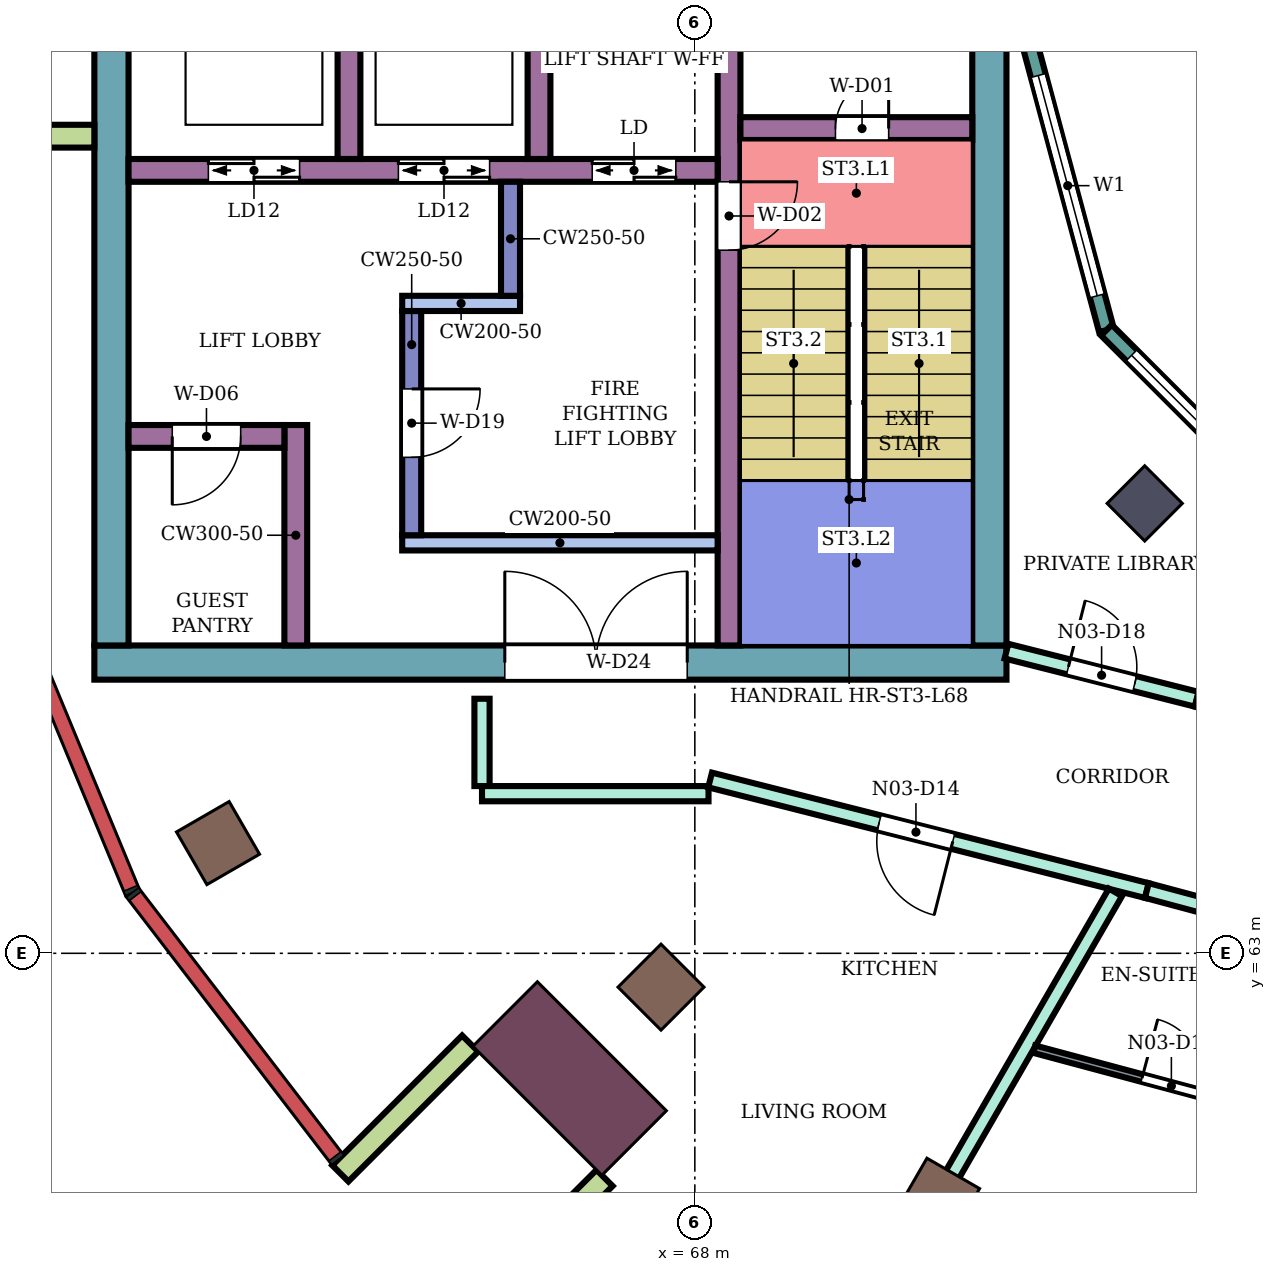
"""IFC4 building model, lengths in metres.
Left out: names, types, materials, properties, quantities, classifications, styles, units other than length and angle.
Written with IfcOpenShell. Run it as: python <this file> out.ifc"""

import sys

from ifc_helpers import new_model, si_unit, direction, frame, frame_2d, origin, origin_2d, place, context, subcontext, project, spatial, rectangle, extrude, element, fill, save


model = new_model("IFC4")
c1 = context("Model", 3, precision=1e-05, world=origin(), true_north=direction((0.0, 1.0)))
c2 = subcontext(c1, "Body", "Model", "MODEL_VIEW")
j1 = project(units=[si_unit("LENGTHUNIT", "METRE"), si_unit("PLANEANGLEUNIT", "RADIAN")], contexts=[c1])
p1 = place(None, origin())
s1 = spatial("IfcSite", under=j1, at=p1, CompositionType="ELEMENT")
p2 = place(p1, origin())
s2 = spatial("IfcBuilding", under=s1, at=p2, CompositionType="ELEMENT")
p3 = place(p2, frame((0.0, 0.0, 296.7)))
s3 = spatial("IfcBuildingStorey", under=s2, at=p3, CompositionType="ELEMENT", Elevation=296.7)
for number, where, z_axis, x_axis in (
    (1, (61.727, 64.45, 0.0), (0.0, 0.0, 1.0), (-0.866, -0.5, 0.0)),
    (2, (67.555, 62.555, 0.0), (0.0, 0.0, 1.0), (-0.707, -0.707, 0.0)),
    (3, (71.2, 59.758, 0.0), (0.0, 0.0, 1.0), (-0.5, -0.866, 0.0)),
):
    element("IfcColumn", number, at=place(p3, frame(where, z_axis=z_axis, x_axis=x_axis)), inside=s3, PredefinedType="COLUMN", context=c2, shape_type="SweptSolid", body=[
        extrude(rectangle(XDim=0.8, YDim=0.8, at=origin_2d()), origin(), (0.0, 0.0, 1.0), 4.2),
    ])
p4 = place(p3, frame((73.919, 68.919, 0.0), z_axis=(0.0, 0.0, 1.0), x_axis=(-0.707106781187, -0.707106781187, 0.0)))
e4 = element("IfcColumn", 4, at=p4, inside=s3, PredefinedType="COLUMN", context=c2, shape_type="SweptSolid", body=[
    extrude(rectangle(XDim=0.7, YDim=0.7, at=origin_2d()), origin(), (0.0, 0.0, 1.0), 4.2),
])
p5 = place(p3, frame((66.353, 61.353, 0.0), z_axis=(0.0, 0.0, 1.0), x_axis=(-0.707106781187, -0.707106781187, 0.0)))
e5 = element("IfcColumn", 5, at=p5, inside=s3, PredefinedType="COLUMN", context=c2, shape_type="SweptSolid", body=[
    extrude(rectangle(XDim=1.2, YDim=2.4, at=origin_2d()), origin(), (0.0, 0.0, 1.0), 4.2),
])
p6 = place(p3, frame((72.1, 66.825, 0.0), z_axis=(0.0, 0.0, 1.0), x_axis=(-1.0, 0.0, 0.0)))
e6 = element("IfcWall", 6, at=p6, inside=s3, PredefinedType="SHEAR", context=c2, shape_type="SweptSolid", body=[
    extrude(rectangle(XDim=12.0, YDim=0.45, at=frame_2d((6.0, 0.0))), origin(), (0.0, 0.0, 1.0), 3.88),
])
p7 = place(p6, frame((4.2, 0.0, 0.0)))
e7 = element("IfcOpeningElement", 7, at=p7, cuts=e6, PredefinedType="OPENING", context=c2, shape_type="SweptSolid", body=[
    extrude(rectangle(XDim=2.4, YDim=2.4, at=frame_2d((1.2, 1.2))), frame((0.0, 0.235, 0.0), z_axis=(0.0, -1.0, 0.0), x_axis=(1.0, 0.0, 0.0)), (0.0, 0.0, 1.0), 0.47),
])
p8 = place(p3, frame((71.875, 75.0, 0.0), z_axis=(0.0, 0.0, 1.0), x_axis=(0.0, -1.0, 0.0)))
e8 = element("IfcWall", 8, at=p8, inside=s3, PredefinedType="SHEAR", context=c2, shape_type="SweptSolid", body=[
    extrude(rectangle(XDim=7.95, YDim=0.45, at=frame_2d((3.975, 0.0))), origin(), (0.0, 0.0, 1.0), 3.88),
])
p9 = place(p3, frame((60.325, 76.4, 0.0), z_axis=(0.0, 0.0, 1.0), x_axis=(0.0, -1.0, 0.0)))
e9 = element("IfcWall", 9, at=p9, inside=s3, PredefinedType="SHEAR", context=c2, shape_type="SweptSolid", body=[
    extrude(rectangle(XDim=9.35, YDim=0.45, at=frame_2d((4.675, 0.0))), origin(), (0.0, 0.0, 1.0), 3.88),
])
p10 = place(p3, frame((68.45, 75.0, 0.0), z_axis=(0.0, 0.0, 1.0), x_axis=(0.0, -1.0, 0.0)))
e10 = element("IfcWall", 10, at=p10, inside=s3, PredefinedType="SHEAR", context=c2, shape_type="SweptSolid", body=[
    extrude(rectangle(XDim=7.95, YDim=0.3, at=frame_2d((3.975, 0.0))), origin(), (0.0, 0.0, 1.0), 3.88),
])
p11 = place(p10, frame((1.85, 0.0, 0.0)))
e11 = element("IfcOpeningElement", 11, at=p11, cuts=e10, PredefinedType="OPENING", context=c2, shape_type="SweptSolid", body=[
    extrude(rectangle(XDim=0.9, YDim=2.1, at=frame_2d((0.45, 1.05))), frame((0.0, 0.16, 0.0), z_axis=(0.0, -1.0, 0.0), x_axis=(1.0, 0.0, 0.0)), (0.0, 0.0, 1.0), 0.32),
])
p12 = place(p3, frame((71.65, 73.85, 0.0), z_axis=(0.0, 0.0, 1.0), x_axis=(-1.0, 0.0, 0.0)))
e12 = element("IfcWall", 12, at=p12, inside=s3, PredefinedType="SHEAR", context=c2, shape_type="SweptSolid", body=[
    extrude(rectangle(XDim=3.05, YDim=0.3, at=frame_2d((1.525, 0.0))), origin(), (0.0, 0.0, 1.0), 3.88),
])
p13 = place(p12, frame((1.1, 0.0, 0.0)))
e13 = element("IfcOpeningElement", 13, at=p13, cuts=e12, PredefinedType="OPENING", context=c2, shape_type="SweptSolid", body=[
    extrude(rectangle(XDim=0.7, YDim=2.0, at=frame_2d((0.35, 1.0))), frame((0.0, 0.16, 0.0), z_axis=(0.0, -1.0, 0.0), x_axis=(1.0, 0.0, 0.0)), (0.0, 0.0, 1.0), 0.32),
])
p14 = place(p3, frame((68.3, 73.3, 0.0), z_axis=(0.0, 0.0, 1.0), x_axis=(-1.0, 0.0, 0.0)))
e14 = element("IfcWall", 14, at=p14, inside=s3, PredefinedType="SHEAR", context=c2, shape_type="SweptSolid", body=[
    extrude(rectangle(XDim=7.75, YDim=0.3, at=frame_2d((3.875, 0.0))), origin(), (0.0, 0.0, 1.0), 3.88),
])
p15 = place(p14, frame((0.55, 0.0, 0.0)))
e15 = element("IfcOpeningElement", 15, at=p15, cuts=e14, PredefinedType="OPENING", context=c2, shape_type="SweptSolid", body=[
    extrude(rectangle(XDim=1.1, YDim=2.1, at=frame_2d((0.55, 1.05))), frame((0.0, 0.16, 0.0), z_axis=(0.0, -1.0, 0.0), x_axis=(1.0, 0.0, 0.0)), (0.0, 0.0, 1.0), 0.32),
])
p16 = place(p14, frame((3.0, 0.0, 0.0)))
e16 = element("IfcOpeningElement", 16, at=p16, cuts=e14, PredefinedType="OPENING", context=c2, shape_type="SweptSolid", body=[
    extrude(rectangle(XDim=1.2, YDim=2.1, at=frame_2d((0.6, 1.05))), frame((0.0, 0.16, 0.0), z_axis=(0.0, -1.0, 0.0), x_axis=(1.0, 0.0, 0.0)), (0.0, 0.0, 1.0), 0.32),
])
p17 = place(p14, frame((5.5, 0.0, 0.0)))
e17 = element("IfcOpeningElement", 17, at=p17, cuts=e14, PredefinedType="OPENING", context=c2, shape_type="SweptSolid", body=[
    extrude(rectangle(XDim=1.2, YDim=2.1, at=frame_2d((0.6, 1.05))), frame((0.0, 0.16, 0.0), z_axis=(0.0, -1.0, 0.0), x_axis=(1.0, 0.0, 0.0)), (0.0, 0.0, 1.0), 0.32),
])
for number, where, z_axis, x_axis in (
    (18, (65.95, 76.0, 0.0), (0.0, 0.0, 1.0), (0.0, -1.0, 0.0)),
    (19, (63.45, 76.0, 0.0), (0.0, 0.0, 1.0), (0.0, -1.0, 0.0)),
):
    element("IfcWall", number, at=place(p3, frame(where, z_axis=z_axis, x_axis=x_axis)), inside=s3, PredefinedType="SHEAR", context=c2, shape_type="SweptSolid", body=[
        extrude(rectangle(XDim=2.55, YDim=0.3, at=frame_2d((1.275, 0.0))), origin(), (0.0, 0.0, 1.0), 3.88),
    ])
p18 = place(p3, frame((68.3, 68.4, 0.0), z_axis=(0.0, 0.0, 1.0), x_axis=(-1.0, 0.0, 0.0)))
e20 = element("IfcWall", 20, at=p18, inside=s3, PredefinedType="SHEAR", context=c2, shape_type="SweptSolid", body=[
    extrude(rectangle(XDim=4.15, YDim=0.2, at=frame_2d((2.075, 0.0))), origin(), (0.0, 0.0, 1.0), 3.88),
])
p19 = place(p3, frame((64.275, 71.45, 0.0), z_axis=(0.0, 0.0, 1.0), x_axis=(0.0, -1.0, 0.0)))
e21 = element("IfcWall", 21, at=p19, inside=s3, PredefinedType="SHEAR", context=c2, shape_type="SweptSolid", body=[
    extrude(rectangle(XDim=2.95, YDim=0.25, at=frame_2d((1.475, 0.0))), origin(), (0.0, 0.0, 1.0), 3.88),
])
p20 = place(p19, frame((1.025, 0.0, 0.0)))
e22 = element("IfcOpeningElement", 22, at=p20, cuts=e21, PredefinedType="OPENING", context=c2, shape_type="SweptSolid", body=[
    extrude(rectangle(XDim=0.9, YDim=2.1, at=frame_2d((0.45, 1.05))), frame((0.0, 0.135, 0.0), z_axis=(0.0, -1.0, 0.0), x_axis=(1.0, 0.0, 0.0)), (0.0, 0.0, 1.0), 0.27),
])
p21 = place(p3, frame((65.7, 71.55, 0.0), z_axis=(0.0, 0.0, 1.0), x_axis=(-1.0, 0.0, 0.0)))
e23 = element("IfcWall", 23, at=p21, inside=s3, PredefinedType="SHEAR", context=c2, shape_type="SweptSolid", body=[
    extrude(rectangle(XDim=1.55, YDim=0.2, at=frame_2d((0.775, 0.0))), origin(), (0.0, 0.0, 1.0), 3.88),
])
p22 = place(p3, frame((65.575, 73.15, 0.0), z_axis=(0.0, 0.0, 1.0), x_axis=(0.0, -1.0, 0.0)))
e24 = element("IfcWall", 24, at=p22, inside=s3, PredefinedType="SHEAR", context=c2, shape_type="SweptSolid", body=[
    extrude(rectangle(XDim=1.5, YDim=0.25, at=frame_2d((0.75, 0.0))), origin(), (0.0, 0.0, 1.0), 3.88),
])
p23 = place(p3, frame((62.75, 69.95, 0.0), z_axis=(0.0, 0.0, 1.0), x_axis=(0.0, -1.0, 0.0)))
e25 = element("IfcWall", 25, at=p23, inside=s3, PredefinedType="SHEAR", context=c2, shape_type="SweptSolid", body=[
    extrude(rectangle(XDim=2.9, YDim=0.3, at=frame_2d((1.45, 0.0))), origin(), (0.0, 0.0, 1.0), 3.88),
])
p24 = place(p3, frame((62.6, 69.8, 0.0), z_axis=(0.0, 0.0, 1.0), x_axis=(-1.0, 0.0, 0.0)))
e26 = element("IfcWall", 26, at=p24, inside=s3, PredefinedType="SHEAR", context=c2, shape_type="SweptSolid", body=[
    extrude(rectangle(XDim=2.05, YDim=0.3, at=frame_2d((1.025, 0.0))), origin(), (0.0, 0.0, 1.0), 3.88),
])
p25 = place(p24, frame((0.575, 0.0, 0.0)))
e27 = element("IfcOpeningElement", 27, at=p25, cuts=e26, PredefinedType="OPENING", context=c2, shape_type="SweptSolid", body=[
    extrude(rectangle(XDim=0.9, YDim=2.1, at=frame_2d((0.45, 1.05))), frame((0.0, 0.16, 0.0), z_axis=(0.0, -1.0, 0.0), x_axis=(1.0, 0.0, 0.0)), (0.0, 0.0, 1.0), 0.32),
])
for number, where, z_axis, x_axis in (
    (28, (60.1, 73.75, 0.0), (0.0, 0.0, 1.0), (-1.0, 0.0, 0.0)),
    (29, (65.045, 61.812, 0.0), (0.0, 0.0, 1.0), (-0.707, -0.707, 0.0)),
    (30, (66.812, 60.045, 0.0), (0.0, 0.0, 1.0), (-0.707, -0.707, 0.0)),
):
    element("IfcWall", number, at=place(p3, frame(where, z_axis=z_axis, x_axis=x_axis)), inside=s3, PredefinedType="NOTDEFINED", context=c2, shape_type="SweptSolid", body=[
        extrude(rectangle(XDim=2.416, YDim=0.3, at=frame_2d((1.208, 0.0))), origin(), (0.0, 0.0, 1.0), 4.2),
    ])
p26 = place(p3, frame((72.396, 75.0, 0.0), z_axis=(0.0, 0.0, 1.0), x_axis=(0.258789828301, -0.965933654434, 0.0)))
e31 = element("IfcWall", 31, at=p26, inside=s3, PredefinedType="NOTDEFINED", context=c2, shape_type="SweptSolid", body=[
    extrude(rectangle(XDim=3.936, YDim=0.2, at=frame_2d((1.968, 0.0))), origin(), (0.0, 0.0, 1.0), 4.2),
])
p27 = place(p26, frame((0.468, 0.0, 0.9)))
e32 = element("IfcOpeningElement", 32, at=p27, cuts=e31, PredefinedType="OPENING", context=c2, shape_type="SweptSolid", body=[
    extrude(rectangle(XDim=3.0, YDim=2.3, at=frame_2d((1.5, 1.15))), frame((0.0, 0.11, 0.0), z_axis=(0.0, -1.0, 0.0), x_axis=(1.0, 0.0, 0.0)), (0.0, 0.0, 1.0), 0.22),
])
p28 = place(p3, frame((73.415, 71.198, 0.0), z_axis=(0.0, 0.0, 1.0), x_axis=(0.707106781187, -0.707106781187, 0.0)))
e33 = element("IfcWall", 33, at=p28, inside=s3, PredefinedType="NOTDEFINED", context=c2, shape_type="SweptSolid", body=[
    extrude(rectangle(XDim=3.936, YDim=0.2, at=frame_2d((1.968, 0.0))), origin(), (0.0, 0.0, 1.0), 4.2),
])
p29 = place(p28, frame((0.468, 0.0, 0.9)))
e34 = element("IfcOpeningElement", 34, at=p29, cuts=e33, PredefinedType="OPENING", context=c2, shape_type="SweptSolid", body=[
    extrude(rectangle(XDim=3.0, YDim=2.3, at=frame_2d((1.5, 1.15))), frame((0.0, 0.11, 0.0), z_axis=(0.0, -1.0, 0.0), x_axis=(1.0, 0.0, 0.0)), (0.0, 0.0, 1.0), 0.22),
])
p30 = place(p3, frame((65.2, 65.2, 0.0), z_axis=(0.0, 0.0, 1.0), x_axis=(0.0, 1.0, 0.0)))
e35 = element("IfcWall", 35, at=p30, inside=s3, PredefinedType="PARTITIONING", context=c2, shape_type="SweptSolid", body=[
    extrude(rectangle(XDim=1.149, YDim=0.2, at=frame_2d((0.575, 0.0))), origin(), (0.0, 0.0, 1.0), 3.75),
])
p31 = place(p3, frame((65.2, 65.1, 0.0), z_axis=(0.0, 0.0, 1.0), x_axis=(1.0, 0.0, 0.0)))
e36 = element("IfcWall", 36, at=p31, inside=s3, PredefinedType="PARTITIONING", context=c2, shape_type="SweptSolid", body=[
    extrude(rectangle(XDim=2.98, YDim=0.2, at=frame_2d((1.49, 0.0))), origin(), (0.0, 0.0, 1.0), 3.75),
])
p32 = place(p3, frame((68.201, 65.28, 0.0), z_axis=(0.0, 0.0, 1.0), x_axis=(0.969421088032, -0.245403247897, 0.0)))
e37 = element("IfcWall", 37, at=p32, inside=s3, PredefinedType="PARTITIONING", context=c2, shape_type="SweptSolid", body=[
    extrude(rectangle(XDim=5.927, YDim=0.2, at=frame_2d((2.964, 0.0))), origin(), (0.0, 0.0, 1.0), 3.75),
])
p33 = place(p32, frame((2.293, 0.0, 0.0)))
e38 = element("IfcOpeningElement", 38, at=p33, cuts=e37, PredefinedType="OPENING", context=c2, shape_type="SweptSolid", body=[
    extrude(rectangle(XDim=1.0, YDim=2.1, at=frame_2d((0.5, 1.05))), frame((0.0, 0.11, 0.0), z_axis=(0.0, -1.0, 0.0), x_axis=(1.0, 0.0, 0.0)), (0.0, 0.0, 1.0), 0.22),
])
p34 = place(p3, frame((68.849, 55.692, 0.0), z_axis=(0.0, 0.0, 1.0), x_axis=(0.50011732958, 0.865957652922, 0.0)))
e39 = element("IfcWall", 39, at=p34, inside=s3, PredefinedType="PARTITIONING", context=c2, shape_type="SweptSolid", body=[
    extrude(rectangle(XDim=9.365, YDim=0.2, at=frame_2d((4.683, 0.0))), origin(), (0.0, 0.0, 1.0), 3.75),
])
p35 = place(p3, frame((72.1, 66.975, 0.0), z_axis=(0.0, 0.0, 1.0), x_axis=(0.969471314457, -0.245204752086, 0.0)))
e40 = element("IfcWall", 40, at=p35, inside=s3, PredefinedType="PARTITIONING", context=c2, shape_type="SweptSolid", body=[
    extrude(rectangle(XDim=2.582, YDim=0.2, at=frame_2d((1.291, 0.0))), origin(), (0.0, 0.0, 1.0), 3.75),
])
p36 = place(p35, frame((0.841, 0.0, 0.0)))
e41 = element("IfcOpeningElement", 41, at=p36, cuts=e40, PredefinedType="OPENING", context=c2, shape_type="SweptSolid", body=[
    extrude(rectangle(XDim=0.9, YDim=2.1, at=frame_2d((0.45, 1.05))), frame((0.0, 0.11, 0.0), z_axis=(0.0, -1.0, 0.0), x_axis=(1.0, 0.0, 0.0)), (0.0, 0.0, 1.0), 0.22),
])
p37 = place(p3, frame((73.947, 63.826, 0.0), z_axis=(0.0, 0.0, 1.0), x_axis=(0.965908253407, -0.258884619088, 0.0)))
e42 = element("IfcWall", 42, at=p37, inside=s3, PredefinedType="PARTITIONING", context=c2, shape_type="SweptSolid", body=[
    extrude(rectangle(XDim=6.217, YDim=0.2, at=frame_2d((3.108, 0.0))), origin(), (0.0, 0.0, 1.0), 3.75),
])
p38 = place(p3, frame((74.603, 66.342, 0.0), z_axis=(0.0, 0.0, 1.0), x_axis=(0.965920893652, -0.258837453254, 0.0)))
e43 = element("IfcWall", 43, at=p38, inside=s3, PredefinedType="PARTITIONING", context=c2, shape_type="SweptSolid", body=[
    extrude(rectangle(XDim=5.458, YDim=0.2, at=frame_2d((2.729, 0.0))), origin(), (0.0, 0.0, 1.0), 3.75),
])
p39 = place(p38, frame((2.512, 0.0, 0.0)))
e44 = element("IfcOpeningElement", 44, at=p39, cuts=e43, PredefinedType="OPENING", context=c2, shape_type="SweptSolid", body=[
    extrude(rectangle(XDim=0.9, YDim=2.1, at=frame_2d((0.45, 1.05))), frame((0.0, 0.11, 0.0), z_axis=(0.0, -1.0, 0.0), x_axis=(1.0, 0.0, 0.0)), (0.0, 0.0, 1.0), 0.22),
])
p40 = place(p3, frame((72.465, 61.739, 0.0), z_axis=(0.0, 0.0, 1.0), x_axis=(0.965899611634, -0.258916859715, 0.0)))
e45 = element("IfcWall", 45, at=p40, inside=s3, PredefinedType="PARTITIONING", context=c2, shape_type="SweptSolid", body=[
    extrude(rectangle(XDim=7.74, YDim=0.1, at=frame_2d((3.87, 0.0))), origin(), (0.0, 0.0, 1.0), 3.75),
])
p41 = place(p40, frame((1.468, 0.0, 0.0)))
e46 = element("IfcOpeningElement", 46, at=p41, cuts=e45, PredefinedType="OPENING", context=c2, shape_type="SweptSolid", body=[
    extrude(rectangle(XDim=0.8, YDim=2.1, at=frame_2d((0.4, 1.05))), frame((0.0, 0.06, 0.0), z_axis=(0.0, -1.0, 0.0), x_axis=(1.0, 0.0, 0.0)), (0.0, 0.0, 1.0), 0.12),
])
p42 = place(p3, frame((74.229, 53.462, 0.0), z_axis=(0.0, 0.0, 1.0), x_axis=(0.258810097991, 0.965928223616, 0.0)))
e47 = element("IfcWall", 47, at=p42, inside=s3, PredefinedType="PARTITIONING", context=c2, shape_type="SweptSolid", body=[
    extrude(rectangle(XDim=9.838, YDim=0.1, at=frame_2d((4.919, 0.0))), origin(), (0.0, 0.0, 1.0), 3.75),
])
p43 = place(p42, frame((3.344, 0.0, 0.0)))
e48 = element("IfcOpeningElement", 48, at=p43, cuts=e47, PredefinedType="OPENING", context=c2, shape_type="SweptSolid", body=[
    extrude(rectangle(XDim=0.9, YDim=2.1, at=frame_2d((0.45, 1.05))), frame((0.0, 0.06, 0.0), z_axis=(0.0, -1.0, 0.0), x_axis=(1.0, 0.0, 0.0)), (0.0, 0.0, 1.0), 0.12),
])
p44 = place(p27, origin())
e49 = element("IfcWindow", 49, at=p44, inside=s3, PartitioningType="SINGLE_PANEL", PredefinedType="WINDOW", context=c2, shape_type="SweptSolid", body=[
    extrude(rectangle(XDim=3.0, YDim=2.3, at=frame_2d((1.5, 1.15))), frame((0.0, 0.03, 0.0), z_axis=(0.0, -1.0, 0.0), x_axis=(1.0, 0.0, 0.0)), (0.0, 0.0, 1.0), 0.06),
])
fill(e32, e49)
p45 = place(p29, origin())
e50 = element("IfcWindow", 50, at=p45, inside=s3, PartitioningType="SINGLE_PANEL", PredefinedType="WINDOW", context=c2, shape_type="SweptSolid", body=[
    extrude(rectangle(XDim=3.0, YDim=2.3, at=frame_2d((1.5, 1.15))), frame((0.0, 0.03, 0.0), z_axis=(0.0, -1.0, 0.0), x_axis=(1.0, 0.0, 0.0)), (0.0, 0.0, 1.0), 0.06),
])
fill(e34, e50)
p46 = place(p41, origin())
e51 = element("IfcDoor", 51, at=p46, inside=s3, OperationType="SINGLE_SWING_LEFT", PredefinedType="DOOR", context=c2, shape_type="SweptSolid", body=[
    extrude(rectangle(XDim=0.8, YDim=2.1, at=frame_2d((0.4, 1.05))), frame((0.0, 0.025, 0.0), z_axis=(0.0, -1.0, 0.0), x_axis=(1.0, 0.0, 0.0)), (0.0, 0.0, 1.0), 0.05),
])
fill(e46, e51)
p47 = place(p33, frame((1.0, 0.0, 0.0), z_axis=(0.0, 0.0, 1.0), x_axis=(-1.0, 0.0, 0.0)))
e52 = element("IfcDoor", 52, at=p47, inside=s3, OperationType="SINGLE_SWING_LEFT", PredefinedType="DOOR", context=c2, shape_type="SweptSolid", body=[
    extrude(rectangle(XDim=1.0, YDim=2.1, at=frame_2d((0.5, 1.05))), frame((0.0, 0.025, 0.0), z_axis=(0.0, -1.0, 0.0), x_axis=(1.0, 0.0, 0.0)), (0.0, 0.0, 1.0), 0.05),
])
fill(e38, e52)
p48 = place(p36, origin())
e53 = element("IfcDoor", 53, at=p48, inside=s3, OperationType="SINGLE_SWING_LEFT", PredefinedType="DOOR", context=c2, shape_type="SweptSolid", body=[
    extrude(rectangle(XDim=0.9, YDim=2.1, at=frame_2d((0.45, 1.05))), frame((0.0, 0.025, 0.0), z_axis=(0.0, -1.0, 0.0), x_axis=(1.0, 0.0, 0.0)), (0.0, 0.0, 1.0), 0.05),
])
fill(e41, e53)
p49 = place(p13, frame((0.7, 0.0, 0.0), z_axis=(0.0, 0.0, 1.0), x_axis=(-1.0, 0.0, 0.0)))
e54 = element("IfcDoor", 54, at=p49, inside=s3, OperationType="SINGLE_SWING_RIGHT", PredefinedType="DOOR", context=c2, shape_type="SweptSolid", body=[
    extrude(rectangle(XDim=0.7, YDim=2.0, at=frame_2d((0.35, 1.0))), frame((0.0, 0.025, 0.0), z_axis=(0.0, -1.0, 0.0), x_axis=(1.0, 0.0, 0.0)), (0.0, 0.0, 1.0), 0.05),
])
fill(e13, e54)
p50 = place(p11, origin())
e55 = element("IfcDoor", 55, at=p50, inside=s3, OperationType="SINGLE_SWING_LEFT", PredefinedType="DOOR", context=c2, shape_type="SweptSolid", body=[
    extrude(rectangle(XDim=0.9, YDim=2.1, at=frame_2d((0.45, 1.05))), frame((0.0, 0.025, 0.0), z_axis=(0.0, -1.0, 0.0), x_axis=(1.0, 0.0, 0.0)), (0.0, 0.0, 1.0), 0.05),
])
fill(e11, e55)
p51 = place(p15, origin())
e56 = element("IfcDoor", 56, at=p51, inside=s3, OperationType="DOUBLE_DOOR_SLIDING", PredefinedType="DOOR", context=c2, shape_type="SweptSolid", body=[
    extrude(rectangle(XDim=1.1, YDim=2.1, at=frame_2d((0.55, 1.05))), frame((0.0, 0.025, 0.0), z_axis=(0.0, -1.0, 0.0), x_axis=(1.0, 0.0, 0.0)), (0.0, 0.0, 1.0), 0.05),
])
fill(e15, e56)
p52 = place(p16, origin())
e57 = element("IfcDoor", 57, at=p52, inside=s3, OperationType="DOUBLE_DOOR_SLIDING", PredefinedType="DOOR", context=c2, shape_type="SweptSolid", body=[
    extrude(rectangle(XDim=1.2, YDim=2.1, at=frame_2d((0.6, 1.05))), frame((0.0, 0.025, 0.0), z_axis=(0.0, -1.0, 0.0), x_axis=(1.0, 0.0, 0.0)), (0.0, 0.0, 1.0), 0.05),
])
fill(e16, e57)
p53 = place(p17, origin())
e58 = element("IfcDoor", 58, at=p53, inside=s3, OperationType="DOUBLE_DOOR_SLIDING", PredefinedType="DOOR", context=c2, shape_type="SweptSolid", body=[
    extrude(rectangle(XDim=1.2, YDim=2.1, at=frame_2d((0.6, 1.05))), frame((0.0, 0.025, 0.0), z_axis=(0.0, -1.0, 0.0), x_axis=(1.0, 0.0, 0.0)), (0.0, 0.0, 1.0), 0.05),
])
fill(e17, e58)
p54 = place(p20, origin())
e59 = element("IfcDoor", 59, at=p54, inside=s3, OperationType="SINGLE_SWING_LEFT", PredefinedType="DOOR", context=c2, shape_type="SweptSolid", body=[
    extrude(rectangle(XDim=0.9, YDim=2.1, at=frame_2d((0.45, 1.05))), frame((0.0, 0.025, 0.0), z_axis=(0.0, -1.0, 0.0), x_axis=(1.0, 0.0, 0.0)), (0.0, 0.0, 1.0), 0.05),
])
fill(e22, e59)
p55 = place(p25, origin())
e60 = element("IfcDoor", 60, at=p55, inside=s3, OperationType="SINGLE_SWING_RIGHT", PredefinedType="DOOR", context=c2, shape_type="SweptSolid", body=[
    extrude(rectangle(XDim=0.9, YDim=2.1, at=frame_2d((0.45, 1.05))), frame((0.0, 0.025, 0.0), z_axis=(0.0, -1.0, 0.0), x_axis=(1.0, 0.0, 0.0)), (0.0, 0.0, 1.0), 0.05),
])
fill(e27, e60)
p56 = place(p7, frame((2.4, 0.0, 0.0), z_axis=(0.0, 0.0, 1.0), x_axis=(-1.0, 0.0, 0.0)))
e61 = element("IfcDoor", 61, at=p56, inside=s3, OperationType="DOUBLE_DOOR_SINGLE_SWING", PredefinedType="DOOR", context=c2, shape_type="SweptSolid", body=[
    extrude(rectangle(XDim=2.4, YDim=2.4, at=frame_2d((1.2, 1.2))), frame((0.0, 0.025, 0.0), z_axis=(0.0, -1.0, 0.0), x_axis=(1.0, 0.0, 0.0)), (0.0, 0.0, 1.0), 0.05),
])
fill(e7, e61)
save(model, sys.argv[1])
